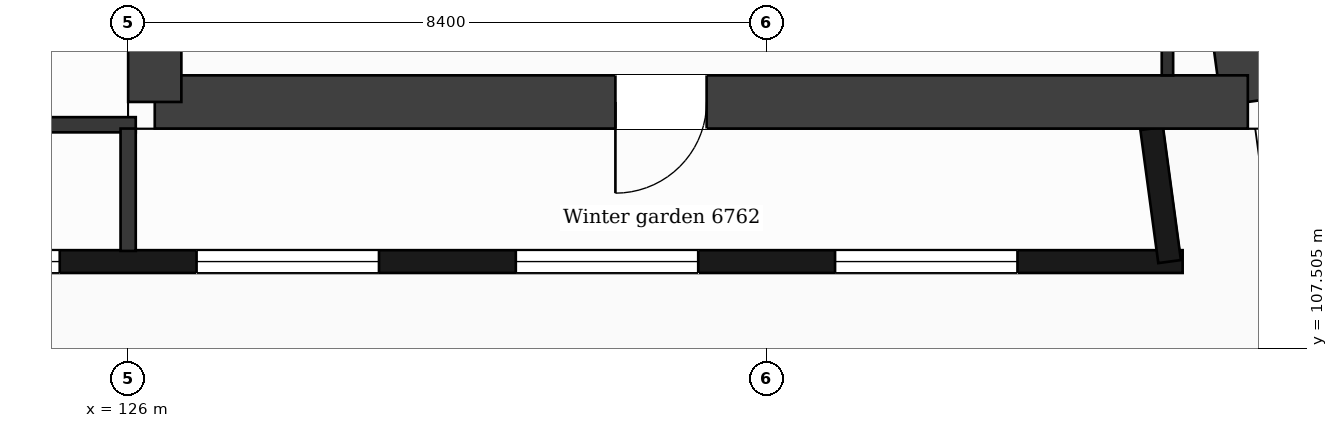
"""IFC4 building model, lengths in metres.
Left out: names, types, materials, properties, quantities, classifications, styles, units other than length and angle.
Written with IfcOpenShell. Run it as: python <this file> out.ifc"""

import sys

from ifc_helpers import new_model, si_unit, direction, frame, frame_2d, origin, place, context, subcontext, project, spatial, rectangle, extrude, element, fill, save


model = new_model("IFC4")
c1 = context("Model", 3, precision=1e-05, world=origin(), true_north=direction((0.0, 1.0)))
c2 = subcontext(c1, "Body", "Model", "MODEL_VIEW")
j1 = project(units=[si_unit("LENGTHUNIT", "METRE"), si_unit("PLANEANGLEUNIT", "RADIAN")], contexts=[c1])
p1 = place(None, origin())
s1 = spatial("IfcSite", under=j1, at=p1, CompositionType="ELEMENT")
p2 = place(p1, origin())
s2 = spatial("IfcBuilding", under=s1, at=p2, CompositionType="ELEMENT")
p3 = place(p2, frame((0.0, 0.0, 277.5)))
s3 = spatial("IfcBuildingStorey", under=s2, at=p3, CompositionType="ELEMENT", Elevation=277.5)
p4 = place(p3, frame((137.863, 132.05, 0.0), z_axis=(0.0, 0.0, 1.0), x_axis=(0.133406218907, -0.991061441464, 0.0)))
e1 = element("IfcWall", 1, at=p4, inside=s3, PredefinedType="SHEAR", context=c2, shape_type="SweptSolid", body=[
    extrude(rectangle(XDim=21.492, YDim=0.7, at=frame_2d((10.746, 0.0))), origin(), (0.0, 0.0, 1.0), 3.7),
])
p5 = place(p3, frame((140.73, 110.75, 0.0), z_axis=(0.0, 0.0, 1.0), x_axis=(-1.0, 0.0, 0.0)))
e2 = element("IfcWall", 2, at=p5, inside=s3, PredefinedType="SHEAR", context=c2, shape_type="SweptSolid", body=[
    extrude(rectangle(XDim=14.38, YDim=0.7, at=frame_2d((7.19, 0.0))), origin(), (0.0, 0.0, 1.0), 3.7),
])
p6 = place(p5, frame((7.12, 0.0, 0.0)))
e3 = element("IfcOpeningElement", 3, at=p6, cuts=e2, PredefinedType="OPENING", context=c2, shape_type="SweptSolid", body=[
    extrude(rectangle(XDim=1.2, YDim=2.1, at=frame_2d((0.6, 1.05))), frame((0.0, 0.36, 0.0), z_axis=(0.0, -1.0, 0.0), x_axis=(1.0, 0.0, 0.0)), (0.0, 0.0, 1.0), 0.72),
])
p7 = place(p3, frame((126.35, 110.75, 0.0), z_axis=(0.0, 0.0, 1.0), x_axis=(0.0, 1.0, 0.0)))
e4 = element("IfcWall", 4, at=p7, inside=s3, PredefinedType="SHEAR", context=c2, shape_type="SweptSolid", body=[
    extrude(rectangle(XDim=21.3, YDim=0.7, at=frame_2d((10.65, 0.0))), origin(), (0.0, 0.0, 1.0), 3.7),
])
p8 = place(p7, frame((12.0, 0.0, 0.0)))
e5 = element("IfcOpeningElement", 5, at=p8, cuts=e4, PredefinedType="OPENING", context=c2, shape_type="SweptSolid", body=[
    extrude(rectangle(XDim=1.4, YDim=2.1, at=frame_2d((0.7, 1.05))), frame((0.0, 0.36, 0.0), z_axis=(0.0, -1.0, 0.0), x_axis=(1.0, 0.0, 0.0)), (0.0, 0.0, 1.0), 0.72),
])
p9 = place(p3, frame((87.099, 108.65, 0.0), z_axis=(0.0, 0.0, 1.0), x_axis=(1.0, 0.0, 0.0)))
e6 = element("IfcWall", 6, at=p9, inside=s3, PredefinedType="SOLIDWALL", context=c2, shape_type="SweptSolid", body=[
    extrude(rectangle(XDim=52.774, YDim=0.3, at=frame_2d((26.387, 0.0))), origin(), (0.0, 0.0, 1.0), 3.38),
])
p10 = place(p9, frame((1.701, 0.0, 0.0)))
e7 = element("IfcOpeningElement", 7, at=p10, cuts=e6, PredefinedType="OPENING", context=c2, shape_type="SweptSolid", body=[
    extrude(rectangle(XDim=1.2, YDim=2.4, at=frame_2d((0.6, 1.2))), frame((0.0, 0.16, 0.0), z_axis=(0.0, -1.0, 0.0), x_axis=(1.0, 0.0, 0.0)), (0.0, 0.0, 1.0), 0.32),
])
p11 = place(p9, frame((3.501, 0.0, 0.9)))
e8 = element("IfcOpeningElement", 8, at=p11, cuts=e6, PredefinedType="OPENING", context=c2, shape_type="SweptSolid", body=[
    extrude(rectangle(XDim=1.2, YDim=2.1, at=frame_2d((0.6, 1.05))), frame((0.0, 0.16, 0.0), z_axis=(0.0, -1.0, 0.0), x_axis=(1.0, 0.0, 0.0)), (0.0, 0.0, 1.0), 0.32),
])
p12 = place(p9, frame((6.201, 0.0, 0.9)))
e9 = element("IfcOpeningElement", 9, at=p12, cuts=e6, PredefinedType="OPENING", context=c2, shape_type="SweptSolid", body=[
    extrude(rectangle(XDim=2.4, YDim=2.1, at=frame_2d((1.2, 1.05))), frame((0.0, 0.16, 0.0), z_axis=(0.0, -1.0, 0.0), x_axis=(1.0, 0.0, 0.0)), (0.0, 0.0, 1.0), 0.32),
])
p13 = place(p9, frame((10.102, 0.0, 0.0)))
e10 = element("IfcOpeningElement", 10, at=p13, cuts=e6, PredefinedType="OPENING", context=c2, shape_type="SweptSolid", body=[
    extrude(rectangle(XDim=1.2, YDim=2.4, at=frame_2d((0.6, 1.2))), frame((0.0, 0.16, 0.0), z_axis=(0.0, -1.0, 0.0), x_axis=(1.0, 0.0, 0.0)), (0.0, 0.0, 1.0), 0.32),
])
p14 = place(p9, frame((11.901, 0.0, 0.9)))
e11 = element("IfcOpeningElement", 11, at=p14, cuts=e6, PredefinedType="OPENING", context=c2, shape_type="SweptSolid", body=[
    extrude(rectangle(XDim=1.2, YDim=2.1, at=frame_2d((0.6, 1.05))), frame((0.0, 0.16, 0.0), z_axis=(0.0, -1.0, 0.0), x_axis=(1.0, 0.0, 0.0)), (0.0, 0.0, 1.0), 0.32),
])
p15 = place(p9, frame((14.602, 0.0, 0.9)))
e12 = element("IfcOpeningElement", 12, at=p15, cuts=e6, PredefinedType="OPENING", context=c2, shape_type="SweptSolid", body=[
    extrude(rectangle(XDim=2.4, YDim=2.1, at=frame_2d((1.2, 1.05))), frame((0.0, 0.16, 0.0), z_axis=(0.0, -1.0, 0.0), x_axis=(1.0, 0.0, 0.0)), (0.0, 0.0, 1.0), 0.32),
])
p16 = place(p9, frame((18.802, 0.0, 0.9)))
e13 = element("IfcOpeningElement", 13, at=p16, cuts=e6, PredefinedType="OPENING", context=c2, shape_type="SweptSolid", body=[
    extrude(rectangle(XDim=2.4, YDim=2.1, at=frame_2d((1.2, 1.05))), frame((0.0, 0.16, 0.0), z_axis=(0.0, -1.0, 0.0), x_axis=(1.0, 0.0, 0.0)), (0.0, 0.0, 1.0), 0.32),
])
p17 = place(p9, frame((23.602, 0.0, 0.9)))
e14 = element("IfcOpeningElement", 14, at=p17, cuts=e6, PredefinedType="OPENING", context=c2, shape_type="SweptSolid", body=[
    extrude(rectangle(XDim=1.2, YDim=2.1, at=frame_2d((0.6, 1.05))), frame((0.0, 0.16, 0.0), z_axis=(0.0, -1.0, 0.0), x_axis=(1.0, 0.0, 0.0)), (0.0, 0.0, 1.0), 0.32),
])
p18 = place(p9, frame((27.802, 0.0, 0.9)))
e15 = element("IfcOpeningElement", 15, at=p18, cuts=e6, PredefinedType="OPENING", context=c2, shape_type="SweptSolid", body=[
    extrude(rectangle(XDim=1.2, YDim=2.1, at=frame_2d((0.6, 1.05))), frame((0.0, 0.16, 0.0), z_axis=(0.0, -1.0, 0.0), x_axis=(1.0, 0.0, 0.0)), (0.0, 0.0, 1.0), 0.32),
])
p19 = place(p9, frame((31.401, 0.0, 0.9)))
e16 = element("IfcOpeningElement", 16, at=p19, cuts=e6, PredefinedType="OPENING", context=c2, shape_type="SweptSolid", body=[
    extrude(rectangle(XDim=2.4, YDim=2.1, at=frame_2d((1.2, 1.05))), frame((0.0, 0.16, 0.0), z_axis=(0.0, -1.0, 0.0), x_axis=(1.0, 0.0, 0.0)), (0.0, 0.0, 1.0), 0.32),
])
p20 = place(p9, frame((35.602, 0.0, 0.9)))
e17 = element("IfcOpeningElement", 17, at=p20, cuts=e6, PredefinedType="OPENING", context=c2, shape_type="SweptSolid", body=[
    extrude(rectangle(XDim=2.4, YDim=2.1, at=frame_2d((1.2, 1.05))), frame((0.0, 0.16, 0.0), z_axis=(0.0, -1.0, 0.0), x_axis=(1.0, 0.0, 0.0)), (0.0, 0.0, 1.0), 0.32),
])
p21 = place(p9, frame((39.802, 0.0, 0.9)))
e18 = element("IfcOpeningElement", 18, at=p21, cuts=e6, PredefinedType="OPENING", context=c2, shape_type="SweptSolid", body=[
    extrude(rectangle(XDim=2.4, YDim=2.1, at=frame_2d((1.2, 1.05))), frame((0.0, 0.16, 0.0), z_axis=(0.0, -1.0, 0.0), x_axis=(1.0, 0.0, 0.0)), (0.0, 0.0, 1.0), 0.32),
])
p22 = place(p9, frame((44.001, 0.0, 0.9)))
e19 = element("IfcOpeningElement", 19, at=p22, cuts=e6, PredefinedType="OPENING", context=c2, shape_type="SweptSolid", body=[
    extrude(rectangle(XDim=2.4, YDim=2.1, at=frame_2d((1.2, 1.05))), frame((0.0, 0.16, 0.0), z_axis=(0.0, -1.0, 0.0), x_axis=(1.0, 0.0, 0.0)), (0.0, 0.0, 1.0), 0.32),
])
p23 = place(p9, frame((48.201, 0.0, 0.9)))
e20 = element("IfcOpeningElement", 20, at=p23, cuts=e6, PredefinedType="OPENING", context=c2, shape_type="SweptSolid", body=[
    extrude(rectangle(XDim=2.4, YDim=2.1, at=frame_2d((1.2, 1.05))), frame((0.0, 0.16, 0.0), z_axis=(0.0, -1.0, 0.0), x_axis=(1.0, 0.0, 0.0)), (0.0, 0.0, 1.0), 0.32),
])
p24 = place(p3, frame((139.701, 108.65, 0.0), z_axis=(0.0, 0.0, 1.0), x_axis=(-0.133422458344, 0.991059255347, 0.0)))
e21 = element("IfcWall", 21, at=p24, inside=s3, PredefinedType="SOLIDWALL", context=c2, shape_type="SweptSolid", body=[
    extrude(rectangle(XDim=1.766, YDim=0.3, at=frame_2d((0.883, 0.0))), origin(), (0.0, 0.0, 1.0), 3.38),
])
p25 = place(p3, frame((100.7, 110.45, 0.0), z_axis=(0.0, 0.0, 1.0), x_axis=(1.0, 0.0, 0.0)))
e22 = element("IfcWall", 22, at=p25, inside=s3, PredefinedType="PARTITIONING", context=c2, shape_type="SweptSolid", body=[
    extrude(rectangle(XDim=25.4, YDim=0.2, at=frame_2d((12.7, 0.0))), origin(), (0.0, 0.0, 1.0), 3.38),
])
p26 = place(p3, frame((126.0, 108.79, 0.0), z_axis=(0.0, 0.0, 1.0), x_axis=(0.0, 1.0, 0.0)))
e23 = element("IfcWall", 23, at=p26, inside=s3, PredefinedType="PARTITIONING", context=c2, shape_type="SweptSolid", body=[
    extrude(rectangle(XDim=1.61, YDim=0.2, at=frame_2d((0.805, 0.0))), origin(), (0.0, 0.0, 1.0), 3.38),
])
p27 = place(p3, frame((139.673, 111.1, 0.0), z_axis=(0.0, 0.0, 1.0), x_axis=(0.0, 1.0, 0.0)))
e24 = element("IfcWall", 24, at=p27, inside=s3, PredefinedType="PARTITIONING", context=c2, shape_type="SweptSolid", body=[
    extrude(rectangle(XDim=1.8, YDim=0.15, at=frame_2d((0.9, 0.0))), origin(), (0.0, 0.0, 1.0), 3.38),
])
p28 = place(p20, origin())
e25 = element("IfcWindow", 25, at=p28, inside=s3, PartitioningType="SINGLE_PANEL", PredefinedType="WINDOW", context=c2, shape_type="SweptSolid", body=[
    extrude(rectangle(XDim=2.4, YDim=2.1, at=frame_2d((1.2, 1.05))), frame((0.0, 0.03, 0.0), z_axis=(0.0, -1.0, 0.0), x_axis=(1.0, 0.0, 0.0)), (0.0, 0.0, 1.0), 0.06),
])
fill(e17, e25)
p29 = place(p21, origin())
e26 = element("IfcWindow", 26, at=p29, inside=s3, PartitioningType="SINGLE_PANEL", PredefinedType="WINDOW", context=c2, shape_type="SweptSolid", body=[
    extrude(rectangle(XDim=2.4, YDim=2.1, at=frame_2d((1.2, 1.05))), frame((0.0, 0.03, 0.0), z_axis=(0.0, -1.0, 0.0), x_axis=(1.0, 0.0, 0.0)), (0.0, 0.0, 1.0), 0.06),
])
fill(e18, e26)
p30 = place(p22, origin())
e27 = element("IfcWindow", 27, at=p30, inside=s3, PartitioningType="SINGLE_PANEL", PredefinedType="WINDOW", context=c2, shape_type="SweptSolid", body=[
    extrude(rectangle(XDim=2.4, YDim=2.1, at=frame_2d((1.2, 1.05))), frame((0.0, 0.03, 0.0), z_axis=(0.0, -1.0, 0.0), x_axis=(1.0, 0.0, 0.0)), (0.0, 0.0, 1.0), 0.06),
])
fill(e19, e27)
p31 = place(p23, origin())
e28 = element("IfcWindow", 28, at=p31, inside=s3, PartitioningType="SINGLE_PANEL", PredefinedType="WINDOW", context=c2, shape_type="SweptSolid", body=[
    extrude(rectangle(XDim=2.4, YDim=2.1, at=frame_2d((1.2, 1.05))), frame((0.0, 0.03, 0.0), z_axis=(0.0, -1.0, 0.0), x_axis=(1.0, 0.0, 0.0)), (0.0, 0.0, 1.0), 0.06),
])
fill(e20, e28)
p32 = place(p6, origin())
e29 = element("IfcDoor", 29, at=p32, inside=s3, OperationType="SINGLE_SWING_RIGHT", PredefinedType="DOOR", context=c2, shape_type="SweptSolid", body=[
    extrude(rectangle(XDim=1.2, YDim=2.1, at=frame_2d((0.6, 1.05))), frame((0.0, 0.025, 0.0), z_axis=(0.0, -1.0, 0.0), x_axis=(1.0, 0.0, 0.0)), (0.0, 0.0, 1.0), 0.05),
])
fill(e3, e29)
save(model, sys.argv[1])
